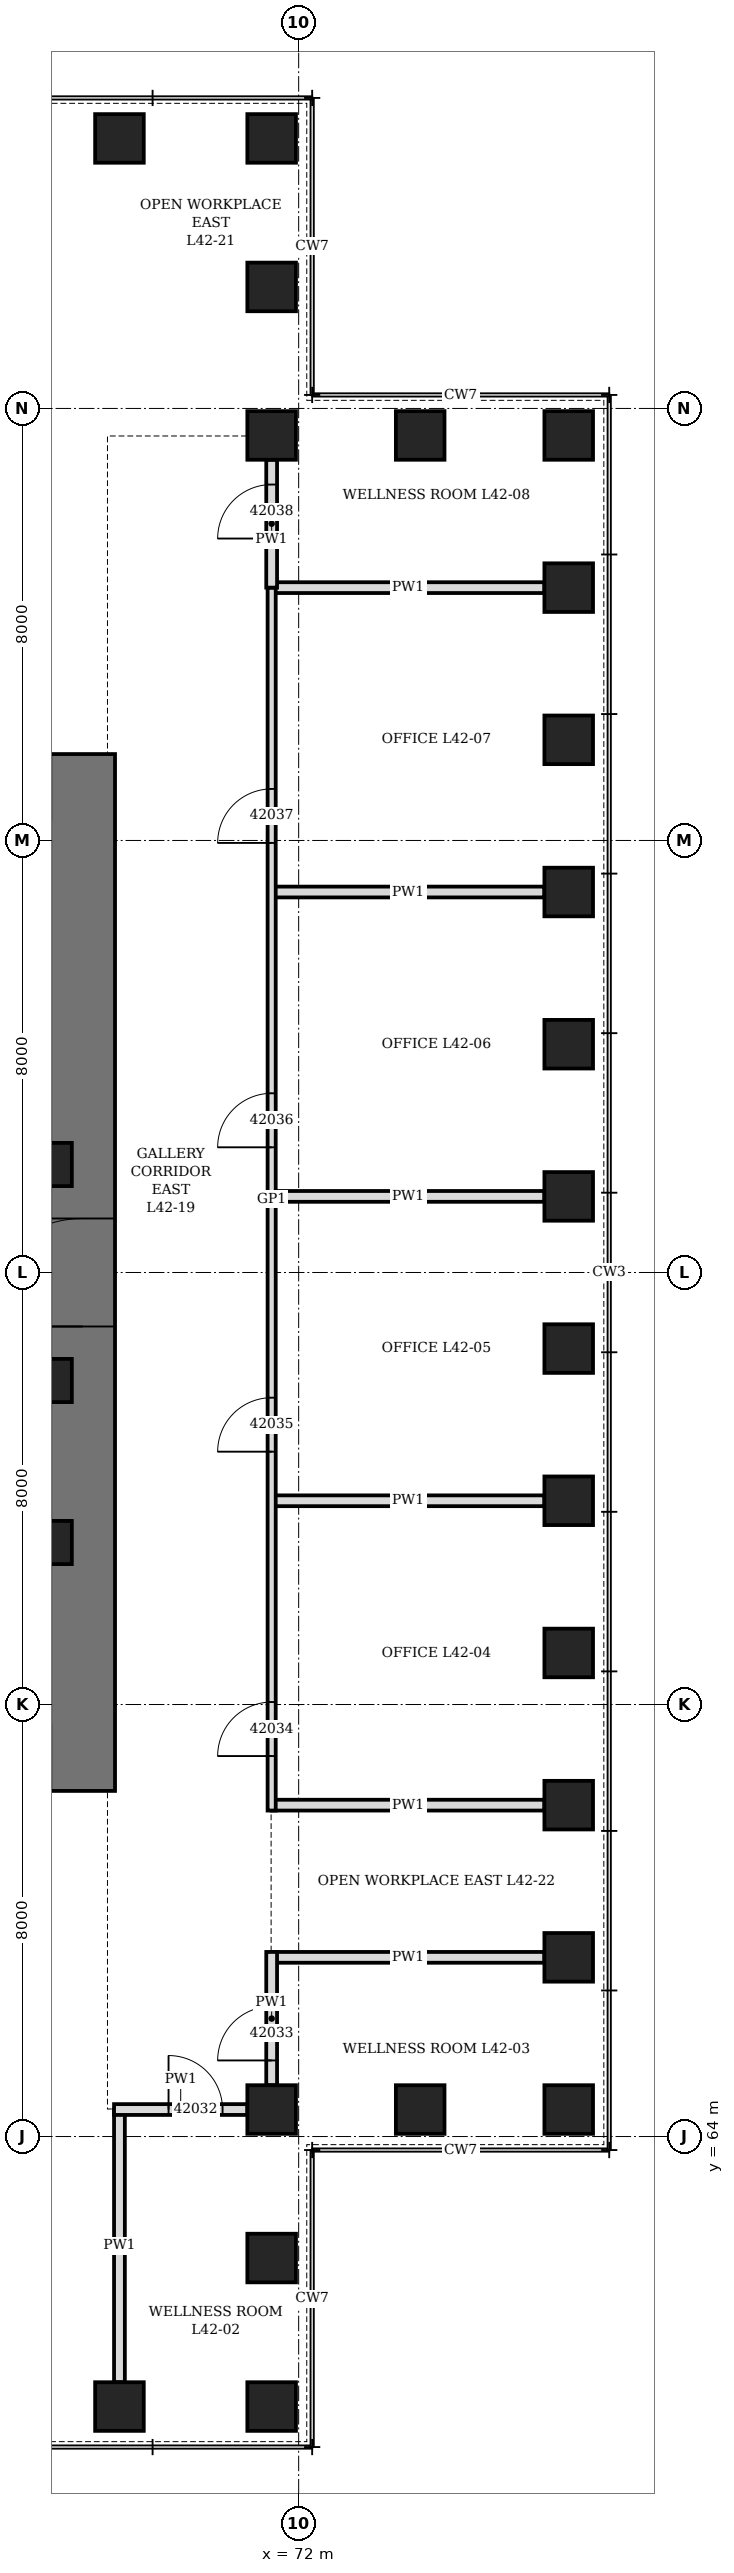
"""IFC4 building model, lengths in metres.
Left out: names, types, materials, properties, quantities, classifications, styles, units other than length and angle.
Written with IfcOpenShell. Run it as: python <this file> out.ifc"""

import sys

from ifc_helpers import new_model, si_unit, direction, frame, frame_2d, origin, origin_2d, place, context, subcontext, project, spatial, rectangle, hollow_rectangle, extrude, element, fill, save


model = new_model("IFC4")
c1 = context("Model", 3, precision=1e-05, world=origin(), true_north=direction((0.0, 1.0)))
c2 = subcontext(c1, "Body", "Model", "MODEL_VIEW")
j1 = project(units=[si_unit("LENGTHUNIT", "METRE"), si_unit("PLANEANGLEUNIT", "RADIAN")], contexts=[c1])
p1 = place(None, origin())
s1 = spatial("IfcSite", under=j1, at=p1, CompositionType="ELEMENT")
p2 = place(p1, origin())
s2 = spatial("IfcBuilding", under=s1, at=p2, CompositionType="ELEMENT")
p3 = place(p2, frame((0.0, 0.0, 189.7)))
s3 = spatial("IfcBuildingStorey", under=s2, at=p3, CompositionType="ELEMENT", Elevation=189.7)
for number, where, z_axis, x_axis in (
    (1, (68.682, 59.0, 0.0), (0.0, 0.0, 1.0), (1.0, 0.0, 0.0)),
    (2, (71.5, 59.0, 0.0), (0.0, 0.0, 1.0), (0.0, 1.0, 0.0)),
    (3, (71.5, 61.75, 0.0), (0.0, 0.0, 1.0), (0.0, 1.0, 0.0)),
    (4, (71.5, 64.5, 0.0), (0.0, 0.0, 1.0), (1.0, 0.0, 0.0)),
    (5, (74.25, 64.5, 0.0), (0.0, 0.0, 1.0), (1.0, 0.0, 0.0)),
    (6, (77.0, 64.5, 0.0), (0.0, 0.0, 1.0), (0.0, 1.0, 0.0)),
    (7, (77.0, 67.318, 0.0), (0.0, 0.0, 1.0), (0.0, 1.0, 0.0)),
    (8, (77.0, 70.136, 0.0), (0.0, 0.0, 1.0), (0.0, 1.0, 0.0)),
    (9, (77.0, 72.955, 0.0), (0.0, 0.0, 1.0), (0.0, 1.0, 0.0)),
    (10, (77.0, 75.773, 0.0), (0.0, 0.0, 1.0), (0.0, 1.0, 0.0)),
    (11, (77.0, 78.591, 0.0), (0.0, 0.0, 1.0), (0.0, 1.0, 0.0)),
    (12, (77.0, 81.409, 0.0), (0.0, 0.0, 1.0), (0.0, 1.0, 0.0)),
    (13, (77.0, 84.227, 0.0), (0.0, 0.0, 1.0), (0.0, 1.0, 0.0)),
    (14, (77.0, 87.045, 0.0), (0.0, 0.0, 1.0), (0.0, 1.0, 0.0)),
    (15, (77.0, 89.864, 0.0), (0.0, 0.0, 1.0), (0.0, 1.0, 0.0)),
    (16, (77.0, 92.682, 0.0), (0.0, 0.0, 1.0), (0.0, 1.0, 0.0)),
    (17, (77.0, 95.5, 0.0), (0.0, 0.0, 1.0), (1.0, 0.0, 0.0)),
    (18, (74.25, 95.5, 0.0), (0.0, 0.0, 1.0), (1.0, 0.0, 0.0)),
    (19, (71.5, 95.5, 0.0), (0.0, 0.0, 1.0), (0.0, 1.0, 0.0)),
    (20, (71.5, 98.25, 0.0), (0.0, 0.0, 1.0), (0.0, 1.0, 0.0)),
    (21, (71.5, 101.0, 0.0), (0.0, 0.0, 1.0), (1.0, 0.0, 0.0)),
    (22, (68.682, 101.0, 0.0), (0.0, 0.0, 1.0), (1.0, 0.0, 0.0)),
):
    element("IfcColumn", number, at=place(p3, frame(where, z_axis=z_axis, x_axis=x_axis)), inside=s3, PredefinedType="COLUMN", context=c2, shape_type="SweptSolid", body=[
        extrude(hollow_rectangle(XDim=0.9, YDim=0.9, WallThickness=0.12, at=origin_2d()), origin(), (0.0, 0.0, 1.0), 4.2),
    ])
p4 = place(p3, frame((68.0, 70.4, 0.0), z_axis=(0.0, 0.0, 1.0), x_axis=(0.0, 1.0, 0.0)))
e23 = element("IfcWall", 23, at=p4, inside=s3, PredefinedType="SHEAR", context=c2, shape_type="SweptSolid", body=[
    extrude(rectangle(XDim=19.2, YDim=1.2, at=frame_2d((9.6, 0.0))), origin(), (0.0, 0.0, 1.0), 4.2),
])
p5 = place(p4, frame((8.6, 0.0, 0.0)))
e24 = element("IfcOpeningElement", 24, at=p5, cuts=e23, PredefinedType="OPENING", context=c2, shape_type="SweptSolid", body=[
    extrude(rectangle(XDim=2.0, YDim=2.4, at=frame_2d((1.0, 1.2))), frame((0.0, 0.61, 0.0), z_axis=(0.0, -1.0, 0.0), x_axis=(1.0, 0.0, 0.0)), (0.0, 0.0, 1.0), 1.22),
])
for number, where, z_axis, x_axis in (
    (25, (67.4, 75.0, 0.0), (0.0, 0.0, 1.0), (1.0, 0.0, 0.0)),
    (26, (67.4, 78.0, 0.0), (0.0, 0.0, 1.0), (1.0, 0.0, 0.0)),
    (27, (67.4, 82.0, 0.0), (0.0, 0.0, 1.0), (1.0, 0.0, 0.0)),
):
    element("IfcColumn", number, at=place(p3, frame(where, z_axis=z_axis, x_axis=x_axis)), inside=s3, PredefinedType="COLUMN", context=c2, shape_type="SweptSolid", body=[
        extrude(hollow_rectangle(XDim=0.8, YDim=0.8, WallThickness=0.1, at=origin_2d()), origin(), (0.0, 0.0, 1.0), 4.2),
    ])
for number, where, z_axis, x_axis in (
    (28, (68.682, 59.45, 0.0), (0.0, 0.0, 1.0), (0.0, 1.0, 0.0)),
    (29, (71.5, 67.318, 0.0), (0.0, 0.0, 1.0), (1.0, 0.0, 0.0)),
    (30, (71.5, 70.136, 0.0), (0.0, 0.0, 1.0), (1.0, 0.0, 0.0)),
    (31, (71.5, 75.773, 0.0), (0.0, 0.0, 1.0), (1.0, 0.0, 0.0)),
    (32, (71.5, 81.409, 0.0), (0.0, 0.0, 1.0), (1.0, 0.0, 0.0)),
    (33, (71.5, 87.045, 0.0), (0.0, 0.0, 1.0), (1.0, 0.0, 0.0)),
    (34, (71.5, 92.682, 0.0), (0.0, 0.0, 1.0), (1.0, 0.0, 0.0)),
):
    element("IfcWall", number, at=place(p3, frame(where, z_axis=z_axis, x_axis=x_axis)), inside=s3, PredefinedType="PARTITIONING", context=c2, shape_type="SweptSolid", body=[
        extrude(rectangle(XDim=5.05, YDim=0.2, at=frame_2d((2.525, 0.0))), origin(), (0.0, 0.0, 1.0), 3.428),
    ])
p6 = place(p3, frame((68.582, 64.5, 0.0), z_axis=(0.0, 0.0, 1.0), x_axis=(1.0, 0.0, 0.0)))
e35 = element("IfcWall", 35, at=p6, inside=s3, PredefinedType="PARTITIONING", context=c2, shape_type="SweptSolid", body=[
    extrude(rectangle(XDim=2.468, YDim=0.2, at=frame_2d((1.234, 0.0))), origin(), (0.0, 0.0, 1.0), 4.04),
])
p7 = place(p6, frame((1.009, 0.0, 0.0)))
e36 = element("IfcOpeningElement", 36, at=p7, cuts=e35, PredefinedType="OPENING", context=c2, shape_type="SweptSolid", body=[
    extrude(rectangle(XDim=1.0, YDim=2.1, at=frame_2d((0.5, 1.05))), frame((0.0, 0.11, 0.0), z_axis=(0.0, -1.0, 0.0), x_axis=(1.0, 0.0, 0.0)), (0.0, 0.0, 1.0), 0.22),
])
p8 = place(p3, frame((71.5, 70.036, 0.0), z_axis=(0.0, 0.0, 1.0), x_axis=(0.0, 1.0, 0.0)))
e37 = element("IfcWall", 37, at=p8, inside=s3, PredefinedType="PARTITIONING", context=c2, shape_type="SweptSolid", body=[
    extrude(rectangle(XDim=22.646, YDim=0.15, at=frame_2d((11.323, 0.0))), origin(), (0.0, 0.0, 1.0), 4.04),
])
p9 = place(p8, frame((1.009, 0.0, 0.0)))
e38 = element("IfcOpeningElement", 38, at=p9, cuts=e37, PredefinedType="OPENING", context=c2, shape_type="SweptSolid", body=[
    extrude(rectangle(XDim=1.0, YDim=2.1, at=frame_2d((0.5, 1.05))), frame((0.0, 0.085, 0.0), z_axis=(0.0, -1.0, 0.0), x_axis=(1.0, 0.0, 0.0)), (0.0, 0.0, 1.0), 0.17),
])
p10 = place(p8, frame((6.646, 0.0, 0.0)))
e39 = element("IfcOpeningElement", 39, at=p10, cuts=e37, PredefinedType="OPENING", context=c2, shape_type="SweptSolid", body=[
    extrude(rectangle(XDim=1.0, YDim=2.1, at=frame_2d((0.5, 1.05))), frame((0.0, 0.085, 0.0), z_axis=(0.0, -1.0, 0.0), x_axis=(1.0, 0.0, 0.0)), (0.0, 0.0, 1.0), 0.17),
])
p11 = place(p8, frame((12.282, 0.0, 0.0)))
e40 = element("IfcOpeningElement", 40, at=p11, cuts=e37, PredefinedType="OPENING", context=c2, shape_type="SweptSolid", body=[
    extrude(rectangle(XDim=1.0, YDim=2.1, at=frame_2d((0.5, 1.05))), frame((0.0, 0.085, 0.0), z_axis=(0.0, -1.0, 0.0), x_axis=(1.0, 0.0, 0.0)), (0.0, 0.0, 1.0), 0.17),
])
p12 = place(p8, frame((17.918, 0.0, 0.0)))
e41 = element("IfcOpeningElement", 41, at=p12, cuts=e37, PredefinedType="OPENING", context=c2, shape_type="SweptSolid", body=[
    extrude(rectangle(XDim=1.0, YDim=2.1, at=frame_2d((0.5, 1.05))), frame((0.0, 0.085, 0.0), z_axis=(0.0, -1.0, 0.0), x_axis=(1.0, 0.0, 0.0)), (0.0, 0.0, 1.0), 0.17),
])
p13 = place(p3, frame((71.5, 64.95, 0.0), z_axis=(0.0, 0.0, 1.0), x_axis=(0.0, 1.0, 0.0)))
e42 = element("IfcWall", 42, at=p13, inside=s3, PredefinedType="PARTITIONING", context=c2, shape_type="SweptSolid", body=[
    extrude(rectangle(XDim=2.468, YDim=0.2, at=frame_2d((1.234, 0.0))), origin(), (0.0, 0.0, 1.0), 4.04),
])
p14 = place(p13, frame((0.459, 0.0, 0.0)))
e43 = element("IfcOpeningElement", 43, at=p14, cuts=e42, PredefinedType="OPENING", context=c2, shape_type="SweptSolid", body=[
    extrude(rectangle(XDim=1.0, YDim=2.1, at=frame_2d((0.5, 1.05))), frame((0.0, 0.11, 0.0), z_axis=(0.0, -1.0, 0.0), x_axis=(1.0, 0.0, 0.0)), (0.0, 0.0, 1.0), 0.22),
])
p15 = place(p3, frame((71.5, 92.682, 0.0), z_axis=(0.0, 0.0, 1.0), x_axis=(0.0, 1.0, 0.0)))
e44 = element("IfcWall", 44, at=p15, inside=s3, PredefinedType="PARTITIONING", context=c2, shape_type="SweptSolid", body=[
    extrude(rectangle(XDim=2.368, YDim=0.2, at=frame_2d((1.184, 0.0))), origin(), (0.0, 0.0, 1.0), 4.04),
])
p16 = place(p15, frame((0.909, 0.0, 0.0)))
e45 = element("IfcOpeningElement", 45, at=p16, cuts=e44, PredefinedType="OPENING", context=c2, shape_type="SweptSolid", body=[
    extrude(rectangle(XDim=1.0, YDim=2.1, at=frame_2d((0.5, 1.05))), frame((0.0, 0.11, 0.0), z_axis=(0.0, -1.0, 0.0), x_axis=(1.0, 0.0, 0.0)), (0.0, 0.0, 1.0), 0.22),
])
p17 = place(p5, origin())
e46 = element("IfcDoor", 46, at=p17, inside=s3, OperationType="DOUBLE_DOOR_SINGLE_SWING", PredefinedType="DOOR", context=c2, shape_type="SweptSolid", body=[
    extrude(rectangle(XDim=2.0, YDim=2.4, at=frame_2d((1.0, 1.2))), frame((0.0, 0.35, 0.0), z_axis=(0.0, -1.0, 0.0), x_axis=(1.0, 0.0, 0.0)), (0.0, 0.0, 1.0), 0.7),
])
fill(e24, e46)
p18 = place(p7, origin())
e47 = element("IfcDoor", 47, at=p18, inside=s3, OperationType="SINGLE_SWING_LEFT", PredefinedType="DOOR", context=c2, shape_type="SweptSolid", body=[
    extrude(rectangle(XDim=1.0, YDim=2.1, at=frame_2d((0.5, 1.05))), frame((0.0, 0.1, 0.0), z_axis=(0.0, -1.0, 0.0), x_axis=(1.0, 0.0, 0.0)), (0.0, 0.0, 1.0), 0.199),
])
fill(e36, e47)
p19 = place(p14, origin())
e48 = element("IfcDoor", 48, at=p19, inside=s3, OperationType="SINGLE_SWING_LEFT", PredefinedType="DOOR", context=c2, shape_type="SweptSolid", body=[
    extrude(rectangle(XDim=1.0, YDim=2.1, at=frame_2d((0.5, 1.05))), frame((0.0, 0.1, 0.0), z_axis=(0.0, -1.0, 0.0), x_axis=(1.0, 0.0, 0.0)), (0.0, 0.0, 1.0), 0.199),
])
fill(e43, e48)
p20 = place(p9, origin())
e49 = element("IfcDoor", 49, at=p20, inside=s3, OperationType="SINGLE_SWING_LEFT", PredefinedType="DOOR", context=c2, shape_type="SweptSolid", body=[
    extrude(rectangle(XDim=1.0, YDim=2.1, at=frame_2d((0.5, 1.05))), frame((0.0, 0.075, 0.0), z_axis=(0.0, -1.0, 0.0), x_axis=(1.0, 0.0, 0.0)), (0.0, 0.0, 1.0), 0.149),
])
fill(e38, e49)
p21 = place(p10, origin())
e50 = element("IfcDoor", 50, at=p21, inside=s3, OperationType="SINGLE_SWING_LEFT", PredefinedType="DOOR", context=c2, shape_type="SweptSolid", body=[
    extrude(rectangle(XDim=1.0, YDim=2.1, at=frame_2d((0.5, 1.05))), frame((0.0, 0.075, 0.0), z_axis=(0.0, -1.0, 0.0), x_axis=(1.0, 0.0, 0.0)), (0.0, 0.0, 1.0), 0.149),
])
fill(e39, e50)
p22 = place(p11, origin())
e51 = element("IfcDoor", 51, at=p22, inside=s3, OperationType="SINGLE_SWING_LEFT", PredefinedType="DOOR", context=c2, shape_type="SweptSolid", body=[
    extrude(rectangle(XDim=1.0, YDim=2.1, at=frame_2d((0.5, 1.05))), frame((0.0, 0.075, 0.0), z_axis=(0.0, -1.0, 0.0), x_axis=(1.0, 0.0, 0.0)), (0.0, 0.0, 1.0), 0.149),
])
fill(e40, e51)
p23 = place(p12, origin())
e52 = element("IfcDoor", 52, at=p23, inside=s3, OperationType="SINGLE_SWING_LEFT", PredefinedType="DOOR", context=c2, shape_type="SweptSolid", body=[
    extrude(rectangle(XDim=1.0, YDim=2.1, at=frame_2d((0.5, 1.05))), frame((0.0, 0.075, 0.0), z_axis=(0.0, -1.0, 0.0), x_axis=(1.0, 0.0, 0.0)), (0.0, 0.0, 1.0), 0.149),
])
fill(e41, e52)
p24 = place(p16, origin())
e53 = element("IfcDoor", 53, at=p24, inside=s3, OperationType="SINGLE_SWING_LEFT", PredefinedType="DOOR", context=c2, shape_type="SweptSolid", body=[
    extrude(rectangle(XDim=1.0, YDim=2.1, at=frame_2d((0.5, 1.05))), frame((0.0, 0.1, 0.0), z_axis=(0.0, -1.0, 0.0), x_axis=(1.0, 0.0, 0.0)), (0.0, 0.0, 1.0), 0.199),
])
fill(e45, e53)
save(model, sys.argv[1])
